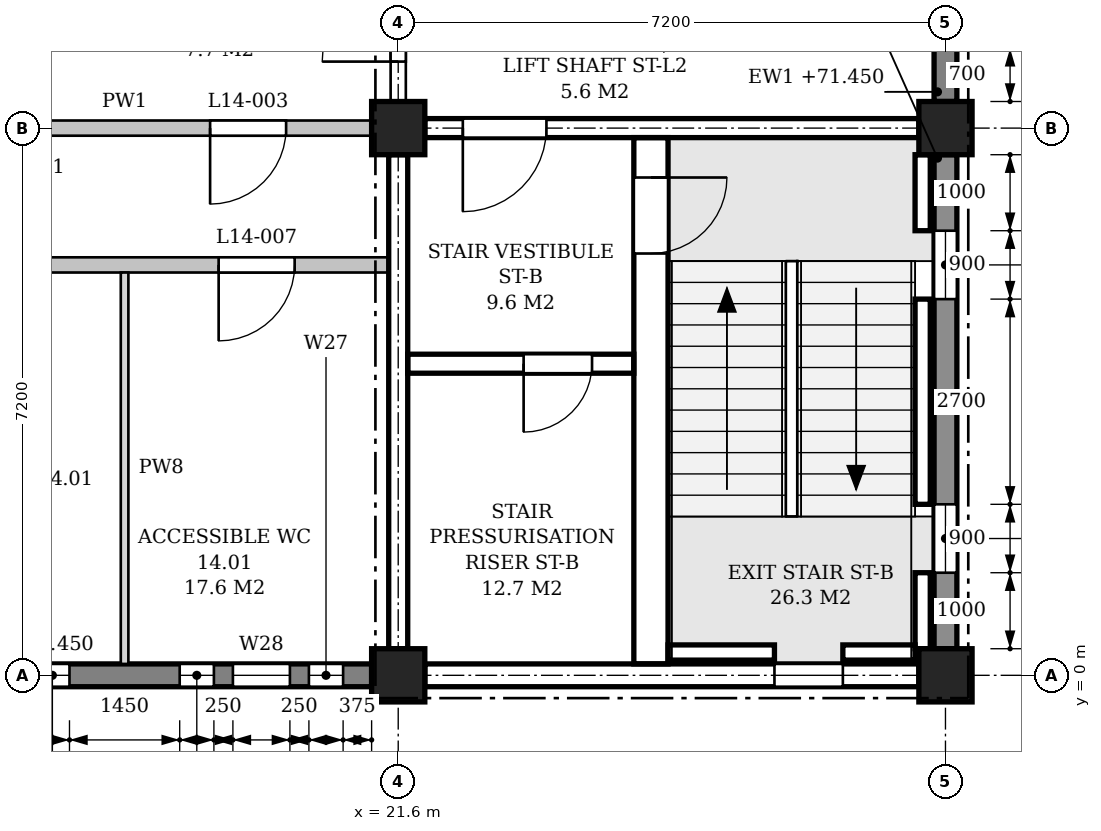
"""IFC4 building model, lengths in metres.
Left out: names, types, materials, properties, quantities, classifications, styles, units other than length and angle.
Written with IfcOpenShell. Run it as: python <this file> out.ifc"""

import sys

from ifc_helpers import new_model, si_unit, direction, frame, frame_2d, origin, origin_2d, place, context, subcontext, project, spatial, polyline, rectangle, outline, extrude, element, fill, save


model = new_model("IFC4")
c1 = context("Model", 3, precision=1e-05, world=origin(), true_north=direction((0.0, 1.0)))
c2 = subcontext(c1, "Body", "Model", "MODEL_VIEW")
j1 = project(units=[si_unit("LENGTHUNIT", "METRE"), si_unit("PLANEANGLEUNIT", "RADIAN")], contexts=[c1])
p1 = place(None, origin())
s1 = spatial("IfcSite", under=j1, at=p1, CompositionType="ELEMENT")
p2 = place(p1, origin())
s2 = spatial("IfcBuilding", under=s1, at=p2, CompositionType="ELEMENT")
p3 = place(p2, frame((0.0, 0.0, 67.8)))
s3 = spatial("IfcBuildingStorey", under=s2, at=p3, CompositionType="ELEMENT", Elevation=67.8)
for number, where, z_axis, x_axis in (
    (1, (21.6, 0.0, 0.0), (0.0, 0.0, 1.0), (1.0, 0.0, 0.0)),
    (2, (21.6, 7.2, 0.0), (0.0, 0.0, 1.0), (1.0, 0.0, 0.0)),
    (3, (28.8, 0.0, 0.0), (0.0, 0.0, 1.0), (1.0, 0.0, 0.0)),
    (4, (28.8, 7.2, 0.0), (0.0, 0.0, 1.0), (1.0, 0.0, 0.0)),
):
    element("IfcColumn", number, at=place(p3, frame(where, z_axis=z_axis, x_axis=x_axis)), inside=s3, PredefinedType="COLUMN", context=c2, shape_type="SweptSolid", body=[
        extrude(rectangle(XDim=0.7, YDim=0.7, at=origin_2d()), origin(), (0.0, 0.0, 1.0), 4.5),
    ])
p4 = place(p3, frame((14.75, 0.0, 0.0), z_axis=(0.0, 0.0, 1.0), x_axis=(1.0, 0.0, 0.0)))
e5 = element("IfcWall", 5, at=p4, inside=s3, PredefinedType="STANDARD", context=c2, shape_type="SweptSolid", body=[
    extrude(rectangle(XDim=6.5, YDim=0.3, at=frame_2d((3.25, 0.0))), origin(), (0.0, 0.0, 1.0), 3.65),
])
p5 = place(p4, frame((0.375, 0.0, 1.5)))
e6 = element("IfcOpeningElement", 6, at=p5, cuts=e5, PredefinedType="OPENING", context=c2, shape_type="SweptSolid", body=[
    extrude(outline(polyline([(0.0, 0.0), (0.45, 0.0), (0.45, 1.85), (0.225, 2.1), (0.0, 1.85), (0.0, 0.0)])), frame((0.0, 0.16, 0.0), z_axis=(0.0, -1.0, 0.0), x_axis=(1.0, 0.0, 0.0)), (0.0, 0.0, 1.0), 0.32),
])
p6 = place(p4, frame((1.075, 0.0, 0.9)))
e7 = element("IfcOpeningElement", 7, at=p6, cuts=e5, PredefinedType="OPENING", context=c2, shape_type="SweptSolid", body=[
    extrude(outline(polyline([(0.0, 0.0), (0.75, 0.0), (0.75, 2.25), (0.375, 2.7), (0.0, 2.25), (0.0, 0.0)])), frame((0.0, 0.16, 0.0), z_axis=(0.0, -1.0, 0.0), x_axis=(1.0, 0.0, 0.0)), (0.0, 0.0, 1.0), 0.32),
])
p7 = place(p4, frame((2.075, 0.0, 1.5)))
e8 = element("IfcOpeningElement", 8, at=p7, cuts=e5, PredefinedType="OPENING", context=c2, shape_type="SweptSolid", body=[
    extrude(outline(polyline([(0.0, 0.0), (0.45, 0.0), (0.45, 1.85), (0.225, 2.1), (0.0, 1.85), (0.0, 0.0)])), frame((0.0, 0.16, 0.0), z_axis=(0.0, -1.0, 0.0), x_axis=(1.0, 0.0, 0.0)), (0.0, 0.0, 1.0), 0.32),
])
p8 = place(p4, frame((3.975, 0.0, 1.5)))
e9 = element("IfcOpeningElement", 9, at=p8, cuts=e5, PredefinedType="OPENING", context=c2, shape_type="SweptSolid", body=[
    extrude(outline(polyline([(0.0, 0.0), (0.45, 0.0), (0.45, 1.85), (0.225, 2.1), (0.0, 1.85), (0.0, 0.0)])), frame((0.0, 0.16, 0.0), z_axis=(0.0, -1.0, 0.0), x_axis=(1.0, 0.0, 0.0)), (0.0, 0.0, 1.0), 0.32),
])
p9 = place(p4, frame((4.675, 0.0, 0.9)))
e10 = element("IfcOpeningElement", 10, at=p9, cuts=e5, PredefinedType="OPENING", context=c2, shape_type="SweptSolid", body=[
    extrude(outline(polyline([(0.0, 0.0), (0.75, 0.0), (0.75, 2.25), (0.375, 2.7), (0.0, 2.25), (0.0, 0.0)])), frame((0.0, 0.16, 0.0), z_axis=(0.0, -1.0, 0.0), x_axis=(1.0, 0.0, 0.0)), (0.0, 0.0, 1.0), 0.32),
])
p10 = place(p4, frame((5.675, 0.0, 1.5)))
e11 = element("IfcOpeningElement", 11, at=p10, cuts=e5, PredefinedType="OPENING", context=c2, shape_type="SweptSolid", body=[
    extrude(outline(polyline([(0.0, 0.0), (0.45, 0.0), (0.45, 1.85), (0.225, 2.1), (0.0, 1.85), (0.0, 0.0)])), frame((0.0, 0.16, 0.0), z_axis=(0.0, -1.0, 0.0), x_axis=(1.0, 0.0, 0.0)), (0.0, 0.0, 1.0), 0.32),
])
p11 = place(p3, frame((21.95, 0.0, 0.0), z_axis=(0.0, 0.0, 1.0), x_axis=(1.0, 0.0, 0.0)))
e12 = element("IfcWall", 12, at=p11, inside=s3, PredefinedType="STANDARD", context=c2, shape_type="SweptSolid", body=[
    extrude(rectangle(XDim=6.5, YDim=0.3, at=frame_2d((3.25, 0.0))), origin(), (0.0, 0.0, 1.0), 3.65),
])
p12 = place(p11, frame((4.6, 0.0, 0.9)))
e13 = element("IfcOpeningElement", 13, at=p12, cuts=e12, PredefinedType="OPENING", context=c2, shape_type="SweptSolid", body=[
    extrude(outline(polyline([(0.0, 0.0), (0.9, 0.0), (0.9, 2.25), (0.45, 2.7), (0.0, 2.25), (0.0, 0.0)])), frame((0.0, 0.16, 0.0), z_axis=(0.0, -1.0, 0.0), x_axis=(1.0, 0.0, 0.0)), (0.0, 0.0, 1.0), 0.32),
])
p13 = place(p3, frame((28.8, 0.35, 0.0), z_axis=(0.0, 0.0, 1.0), x_axis=(0.0, 1.0, 0.0)))
e14 = element("IfcWall", 14, at=p13, inside=s3, PredefinedType="STANDARD", context=c2, shape_type="SweptSolid", body=[
    extrude(rectangle(XDim=6.5, YDim=0.3, at=frame_2d((3.25, 0.0))), origin(), (0.0, 0.0, 1.0), 3.65),
])
p14 = place(p13, frame((1.0, 0.0, 0.9)))
e15 = element("IfcOpeningElement", 15, at=p14, cuts=e14, PredefinedType="OPENING", context=c2, shape_type="SweptSolid", body=[
    extrude(outline(polyline([(0.0, 0.0), (0.9, 0.0), (0.9, 2.25), (0.45, 2.7), (0.0, 2.25), (0.0, 0.0)])), frame((0.0, 0.16, 0.0), z_axis=(0.0, -1.0, 0.0), x_axis=(1.0, 0.0, 0.0)), (0.0, 0.0, 1.0), 0.32),
])
p15 = place(p13, frame((4.6, 0.0, 0.9)))
e16 = element("IfcOpeningElement", 16, at=p15, cuts=e14, PredefinedType="OPENING", context=c2, shape_type="SweptSolid", body=[
    extrude(outline(polyline([(0.0, 0.0), (0.9, 0.0), (0.9, 2.25), (0.45, 2.7), (0.0, 2.25), (0.0, 0.0)])), frame((0.0, 0.16, 0.0), z_axis=(0.0, -1.0, 0.0), x_axis=(1.0, 0.0, 0.0)), (0.0, 0.0, 1.0), 0.32),
])
p16 = place(p3, frame((28.8, 7.55, 0.0), z_axis=(0.0, 0.0, 1.0), x_axis=(0.0, 1.0, 0.0)))
e17 = element("IfcWall", 17, at=p16, inside=s3, PredefinedType="STANDARD", context=c2, shape_type="SweptSolid", body=[
    extrude(rectangle(XDim=6.5, YDim=0.3, at=frame_2d((3.25, 0.0))), origin(), (0.0, 0.0, 1.0), 3.65),
])
p17 = place(p16, frame((0.7, 0.0, 0.9)))
e18 = element("IfcOpeningElement", 18, at=p17, cuts=e17, PredefinedType="OPENING", context=c2, shape_type="SweptSolid", body=[
    extrude(outline(polyline([(0.0, 0.0), (1.5, 0.0), (1.5, 1.95), (0.75, 2.7), (0.0, 1.95), (0.0, 0.0)])), frame((0.0, 0.16, 0.0), z_axis=(0.0, -1.0, 0.0), x_axis=(1.0, 0.0, 0.0)), (0.0, 0.0, 1.0), 0.32),
])
p18 = place(p3, frame((21.95, 7.2, 0.0), z_axis=(0.0, 0.0, 1.0), x_axis=(1.0, 0.0, 0.0)))
e19 = element("IfcWall", 19, at=p18, inside=s3, PredefinedType="SHEAR", context=c2, shape_type="SweptSolid", body=[
    extrude(rectangle(XDim=6.5, YDim=0.25, at=frame_2d((3.25, 0.0))), origin(), (0.0, 0.0, 1.0), 3.6),
])
p19 = place(p18, frame((0.5, 0.0, 0.0)))
e20 = element("IfcOpeningElement", 20, at=p19, cuts=e19, PredefinedType="OPENING", context=c2, shape_type="SweptSolid", body=[
    extrude(rectangle(XDim=1.1, YDim=2.1, at=frame_2d((0.55, 1.05))), frame((0.0, 0.135, 0.0), z_axis=(0.0, -1.0, 0.0), x_axis=(1.0, 0.0, 0.0)), (0.0, 0.0, 1.0), 0.27),
])
p20 = place(p3, frame((21.6, 0.35, 0.0), z_axis=(0.0, 0.0, 1.0), x_axis=(0.0, 1.0, 0.0)))
e21 = element("IfcWall", 21, at=p20, inside=s3, PredefinedType="SHEAR", context=c2, shape_type="SweptSolid", body=[
    extrude(rectangle(XDim=6.5, YDim=0.25, at=frame_2d((3.25, 0.0))), origin(), (0.0, 0.0, 1.0), 3.6),
])
p21 = place(p3, frame((28.5, 0.35, -0.25), z_axis=(0.0, 0.0, 1.0), x_axis=(0.0, 1.0, 0.0)))
e22 = element("IfcWall", 22, at=p21, inside=s3, PredefinedType="SHEAR", context=c2, shape_type="SweptSolid", body=[
    extrude(rectangle(XDim=1.0, YDim=0.2, at=frame_2d((0.5, 0.0))), origin(), (0.0, 0.0, 1.0), 4.5),
])
p22 = place(p3, frame((28.5, 2.25, -0.25), z_axis=(0.0, 0.0, 1.0), x_axis=(0.0, 1.0, 0.0)))
e23 = element("IfcWall", 23, at=p22, inside=s3, PredefinedType="SHEAR", context=c2, shape_type="SweptSolid", body=[
    extrude(rectangle(XDim=2.7, YDim=0.2, at=frame_2d((1.35, 0.0))), origin(), (0.0, 0.0, 1.0), 4.5),
])
p23 = place(p3, frame((28.5, 5.85, -0.25), z_axis=(0.0, 0.0, 1.0), x_axis=(0.0, 1.0, 0.0)))
e24 = element("IfcWall", 24, at=p23, inside=s3, PredefinedType="SHEAR", context=c2, shape_type="SweptSolid", body=[
    extrude(rectangle(XDim=1.0, YDim=0.2, at=frame_2d((0.5, 0.0))), origin(), (0.0, 0.0, 1.0), 4.5),
])
p24 = place(p3, frame((25.15, 0.3, -0.25), z_axis=(0.0, 0.0, 1.0), x_axis=(1.0, 0.0, 0.0)))
e25 = element("IfcWall", 25, at=p24, inside=s3, PredefinedType="SHEAR", context=c2, shape_type="SweptSolid", body=[
    extrude(rectangle(XDim=1.4, YDim=0.2, at=frame_2d((0.7, 0.0))), origin(), (0.0, 0.0, 1.0), 4.5),
])
p25 = place(p3, frame((27.45, 0.3, -0.25), z_axis=(0.0, 0.0, 1.0), x_axis=(1.0, 0.0, 0.0)))
e26 = element("IfcWall", 26, at=p25, inside=s3, PredefinedType="SHEAR", context=c2, shape_type="SweptSolid", body=[
    extrude(rectangle(XDim=0.95, YDim=0.2, at=frame_2d((0.475, 0.0))), origin(), (0.0, 0.0, 1.0), 4.5),
])
p26 = place(p3, frame((24.925, 0.15, 0.0), z_axis=(0.0, 0.0, 1.0), x_axis=(0.0, 1.0, 0.0)))
e27 = element("IfcWall", 27, at=p26, inside=s3, PredefinedType="SHEAR", context=c2, shape_type="SweptSolid", body=[
    extrude(rectangle(XDim=6.925, YDim=0.45, at=frame_2d((3.462, 0.0))), origin(), (0.0, 0.0, 1.0), 4.25),
])
p27 = place(p26, frame((5.4, 0.0, 0.0)))
e28 = element("IfcOpeningElement", 28, at=p27, cuts=e27, PredefinedType="OPENING", context=c2, shape_type="SweptSolid", body=[
    extrude(rectangle(XDim=1.0, YDim=2.1, at=frame_2d((0.5, 1.05))), frame((0.0, 0.235, 0.0), z_axis=(0.0, -1.0, 0.0), x_axis=(1.0, 0.0, 0.0)), (0.0, 0.0, 1.0), 0.47),
])
p28 = place(p3, frame((21.725, 4.1, 0.0), z_axis=(0.0, 0.0, 1.0), x_axis=(1.0, 0.0, 0.0)))
e29 = element("IfcWall", 29, at=p28, inside=s3, PredefinedType="SHEAR", context=c2, shape_type="SweptSolid", body=[
    extrude(rectangle(XDim=2.975, YDim=0.25, at=frame_2d((1.487, 0.0))), origin(), (0.0, 0.0, 1.0), 4.25),
])
p29 = place(p28, frame((1.525, 0.0, 0.0)))
e30 = element("IfcOpeningElement", 30, at=p29, cuts=e29, PredefinedType="OPENING", context=c2, shape_type="SweptSolid", body=[
    extrude(rectangle(XDim=0.9, YDim=2.1, at=frame_2d((0.45, 1.05))), frame((0.0, 0.135, 0.0), z_axis=(0.0, -1.0, 0.0), x_axis=(1.0, 0.0, 0.0)), (0.0, 0.0, 1.0), 0.27),
])
p30 = place(p3, frame((7.325, 5.4, 0.0), z_axis=(0.0, 0.0, 1.0), x_axis=(1.0, 0.0, 0.0)))
e31 = element("IfcWall", 31, at=p30, inside=s3, PredefinedType="PARTITIONING", context=c2, shape_type="SweptSolid", body=[
    extrude(outline(polyline([(0.0, 0.0), (14.15, 0.0), (14.15, 3.6), (14.075, 3.6), (14.075, 4.25), (7.275, 4.25), (7.275, 3.6), (6.875, 3.6), (6.875, 4.25), (0.075, 4.25), (0.075, 3.6), (0.0, 3.6), (0.0, 0.0)])), frame((0.0, 0.1, 0.0), z_axis=(0.0, -1.0, 0.0), x_axis=(1.0, 0.0, 0.0)), (0.0, 0.0, 1.0), 0.2),
])
p31 = place(p30, frame((1.238, 0.0, 0.0)))
e32 = element("IfcOpeningElement", 32, at=p31, cuts=e31, PredefinedType="OPENING", context=c2, shape_type="SweptSolid", body=[
    extrude(rectangle(XDim=1.0, YDim=2.1, at=frame_2d((0.5, 1.05))), frame((0.0, 0.11, 0.0), z_axis=(0.0, -1.0, 0.0), x_axis=(1.0, 0.0, 0.0)), (0.0, 0.0, 1.0), 0.22),
])
p32 = place(p30, frame((4.775, 0.0, 0.0)))
e33 = element("IfcOpeningElement", 33, at=p32, cuts=e31, PredefinedType="OPENING", context=c2, shape_type="SweptSolid", body=[
    extrude(rectangle(XDim=1.0, YDim=2.1, at=frame_2d((0.5, 1.05))), frame((0.0, 0.11, 0.0), z_axis=(0.0, -1.0, 0.0), x_axis=(1.0, 0.0, 0.0)), (0.0, 0.0, 1.0), 0.22),
])
p33 = place(p30, frame((8.375, 0.0, 0.0)))
e34 = element("IfcOpeningElement", 34, at=p33, cuts=e31, PredefinedType="OPENING", context=c2, shape_type="SweptSolid", body=[
    extrude(rectangle(XDim=1.0, YDim=2.1, at=frame_2d((0.5, 1.05))), frame((0.0, 0.11, 0.0), z_axis=(0.0, -1.0, 0.0), x_axis=(1.0, 0.0, 0.0)), (0.0, 0.0, 1.0), 0.22),
])
p34 = place(p30, frame((11.913, 0.0, 0.0)))
e35 = element("IfcOpeningElement", 35, at=p34, cuts=e31, PredefinedType="OPENING", context=c2, shape_type="SweptSolid", body=[
    extrude(rectangle(XDim=1.0, YDim=2.1, at=frame_2d((0.5, 1.05))), frame((0.0, 0.11, 0.0), z_axis=(0.0, -1.0, 0.0), x_axis=(1.0, 0.0, 0.0)), (0.0, 0.0, 1.0), 0.22),
])
p35 = place(p3, frame((14.75, 7.2, 0.0), z_axis=(0.0, 0.0, 1.0), x_axis=(1.0, 0.0, 0.0)))
e36 = element("IfcWall", 36, at=p35, inside=s3, PredefinedType="PARTITIONING", context=c2, shape_type="SweptSolid", body=[
    extrude(rectangle(XDim=6.5, YDim=0.2, at=frame_2d((3.25, 0.0))), origin(), (0.0, 0.0, 1.0), 3.6),
])
p36 = place(p35, frame((4.375, 0.0, 0.0)))
e37 = element("IfcOpeningElement", 37, at=p36, cuts=e36, PredefinedType="OPENING", context=c2, shape_type="SweptSolid", body=[
    extrude(rectangle(XDim=1.0, YDim=2.1, at=frame_2d((0.5, 1.05))), frame((0.0, 0.11, 0.0), z_axis=(0.0, -1.0, 0.0), x_axis=(1.0, 0.0, 0.0)), (0.0, 0.0, 1.0), 0.22),
])
p37 = place(p3, frame((18.0, 0.15, 0.0), z_axis=(0.0, 0.0, 1.0), x_axis=(0.0, 1.0, 0.0)))
e38 = element("IfcWall", 38, at=p37, inside=s3, PredefinedType="PARTITIONING", context=c2, shape_type="SweptSolid", body=[
    extrude(rectangle(XDim=5.15, YDim=0.1, at=frame_2d((2.575, 0.0))), origin(), (0.0, 0.0, 1.0), 3.6),
])
p38 = place(p3, frame((21.6, 7.55, 0.0), z_axis=(0.0, 0.0, 1.0), x_axis=(0.0, 1.0, 0.0)))
e39 = element("IfcWall", 39, at=p38, inside=s3, PredefinedType="PARTITIONING", context=c2, shape_type="SweptSolid", body=[
    extrude(rectangle(XDim=2.775, YDim=0.2, at=frame_2d((1.387, 0.0))), origin(), (0.0, 0.0, 1.0), 3.6),
])
p39 = place(p38, frame((0.525, 0.0, 0.0)))
e40 = element("IfcOpeningElement", 40, at=p39, cuts=e39, PredefinedType="OPENING", context=c2, shape_type="SweptSolid", body=[
    extrude(rectangle(XDim=1.0, YDim=2.1, at=frame_2d((0.5, 1.05))), frame((0.0, 0.11, 0.0), z_axis=(0.0, -1.0, 0.0), x_axis=(1.0, 0.0, 0.0)), (0.0, 0.0, 1.0), 0.22),
])
p40 = place(p14, origin())
e41 = element("IfcWindow", 41, at=p40, inside=s3, PartitioningType="SINGLE_PANEL", PredefinedType="WINDOW", context=c2, shape_type="SweptSolid", body=[
    extrude(outline(polyline([(0.0, 0.0), (0.9, 0.0), (0.9, 2.25), (0.45, 2.7), (0.0, 2.25), (0.0, 0.0)])), frame((0.0, 0.03, 0.0), z_axis=(0.0, -1.0, 0.0), x_axis=(1.0, 0.0, 0.0)), (0.0, 0.0, 1.0), 0.06),
])
fill(e15, e41)
p41 = place(p15, origin())
e42 = element("IfcWindow", 42, at=p41, inside=s3, PartitioningType="SINGLE_PANEL", PredefinedType="WINDOW", context=c2, shape_type="SweptSolid", body=[
    extrude(outline(polyline([(0.0, 0.0), (0.9, 0.0), (0.9, 2.25), (0.45, 2.7), (0.0, 2.25), (0.0, 0.0)])), frame((0.0, 0.03, 0.0), z_axis=(0.0, -1.0, 0.0), x_axis=(1.0, 0.0, 0.0)), (0.0, 0.0, 1.0), 0.06),
])
fill(e16, e42)
p42 = place(p7, origin())
e43 = element("IfcWindow", 43, at=p42, inside=s3, PartitioningType="SINGLE_PANEL", PredefinedType="WINDOW", context=c2, shape_type="SweptSolid", body=[
    extrude(outline(polyline([(0.0, 0.0), (0.45, 0.0), (0.45, 1.85), (0.225, 2.1), (0.0, 1.85), (0.0, 0.0)])), frame((0.0, 0.03, 0.0), z_axis=(0.0, -1.0, 0.0), x_axis=(1.0, 0.0, 0.0)), (0.0, 0.0, 1.0), 0.06),
])
fill(e8, e43)
p43 = place(p8, origin())
e44 = element("IfcWindow", 44, at=p43, inside=s3, PartitioningType="SINGLE_PANEL", PredefinedType="WINDOW", context=c2, shape_type="SweptSolid", body=[
    extrude(outline(polyline([(0.0, 0.0), (0.45, 0.0), (0.45, 1.85), (0.225, 2.1), (0.0, 1.85), (0.0, 0.0)])), frame((0.0, 0.03, 0.0), z_axis=(0.0, -1.0, 0.0), x_axis=(1.0, 0.0, 0.0)), (0.0, 0.0, 1.0), 0.06),
])
fill(e9, e44)
p44 = place(p9, origin())
e45 = element("IfcWindow", 45, at=p44, inside=s3, PartitioningType="SINGLE_PANEL", PredefinedType="WINDOW", context=c2, shape_type="SweptSolid", body=[
    extrude(outline(polyline([(0.0, 0.0), (0.75, 0.0), (0.75, 2.25), (0.375, 2.7), (0.0, 2.25), (0.0, 0.0)])), frame((0.0, 0.03, 0.0), z_axis=(0.0, -1.0, 0.0), x_axis=(1.0, 0.0, 0.0)), (0.0, 0.0, 1.0), 0.06),
])
fill(e10, e45)
p45 = place(p10, origin())
e46 = element("IfcWindow", 46, at=p45, inside=s3, PartitioningType="SINGLE_PANEL", PredefinedType="WINDOW", context=c2, shape_type="SweptSolid", body=[
    extrude(outline(polyline([(0.0, 0.0), (0.45, 0.0), (0.45, 1.85), (0.225, 2.1), (0.0, 1.85), (0.0, 0.0)])), frame((0.0, 0.03, 0.0), z_axis=(0.0, -1.0, 0.0), x_axis=(1.0, 0.0, 0.0)), (0.0, 0.0, 1.0), 0.06),
])
fill(e11, e46)
p46 = place(p12, origin())
e47 = element("IfcWindow", 47, at=p46, inside=s3, PartitioningType="SINGLE_PANEL", PredefinedType="WINDOW", context=c2, shape_type="SweptSolid", body=[
    extrude(outline(polyline([(0.0, 0.0), (0.9, 0.0), (0.9, 2.25), (0.45, 2.7), (0.0, 2.25), (0.0, 0.0)])), frame((0.0, 0.03, 0.0), z_axis=(0.0, -1.0, 0.0), x_axis=(1.0, 0.0, 0.0)), (0.0, 0.0, 1.0), 0.06),
])
fill(e13, e47)
p47 = place(p27, frame((1.0, 0.0, 0.0), z_axis=(0.0, 0.0, 1.0), x_axis=(-1.0, 0.0, 0.0)))
e48 = element("IfcDoor", 48, at=p47, inside=s3, OperationType="SINGLE_SWING_LEFT", PredefinedType="DOOR", context=c2, shape_type="SweptSolid", body=[
    extrude(rectangle(XDim=1.0, YDim=2.1, at=frame_2d((0.5, 1.05))), frame((0.0, 0.025, 0.0), z_axis=(0.0, -1.0, 0.0), x_axis=(1.0, 0.0, 0.0)), (0.0, 0.0, 1.0), 0.05),
])
fill(e28, e48)
p48 = place(p19, frame((1.1, 0.0, 0.0), z_axis=(0.0, 0.0, 1.0), x_axis=(-1.0, 0.0, 0.0)))
e49 = element("IfcDoor", 49, at=p48, inside=s3, OperationType="SINGLE_SWING_RIGHT", PredefinedType="DOOR", context=c2, shape_type="SweptSolid", body=[
    extrude(rectangle(XDim=1.1, YDim=2.1, at=frame_2d((0.55, 1.05))), frame((0.0, 0.025, 0.0), z_axis=(0.0, -1.0, 0.0), x_axis=(1.0, 0.0, 0.0)), (0.0, 0.0, 1.0), 0.05),
])
fill(e20, e49)
p49 = place(p29, frame((0.9, 0.0, 0.0), z_axis=(0.0, 0.0, 1.0), x_axis=(-1.0, 0.0, 0.0)))
e50 = element("IfcDoor", 50, at=p49, inside=s3, OperationType="SINGLE_SWING_RIGHT", PredefinedType="DOOR", context=c2, shape_type="SweptSolid", body=[
    extrude(rectangle(XDim=0.9, YDim=2.1, at=frame_2d((0.45, 1.05))), frame((0.0, 0.025, 0.0), z_axis=(0.0, -1.0, 0.0), x_axis=(1.0, 0.0, 0.0)), (0.0, 0.0, 1.0), 0.05),
])
fill(e30, e50)
p50 = place(p39, origin())
e51 = element("IfcDoor", 51, at=p50, inside=s3, OperationType="SINGLE_SWING_LEFT", PredefinedType="DOOR", context=c2, shape_type="SweptSolid", body=[
    extrude(rectangle(XDim=1.0, YDim=2.1, at=frame_2d((0.5, 1.05))), frame((0.0, 0.025, 0.0), z_axis=(0.0, -1.0, 0.0), x_axis=(1.0, 0.0, 0.0)), (0.0, 0.0, 1.0), 0.05),
])
fill(e40, e51)
p51 = place(p36, frame((1.0, 0.0, 0.0), z_axis=(0.0, 0.0, 1.0), x_axis=(-1.0, 0.0, 0.0)))
e52 = element("IfcDoor", 52, at=p51, inside=s3, OperationType="SINGLE_SWING_RIGHT", PredefinedType="DOOR", context=c2, shape_type="SweptSolid", body=[
    extrude(rectangle(XDim=1.0, YDim=2.1, at=frame_2d((0.5, 1.05))), frame((0.0, 0.025, 0.0), z_axis=(0.0, -1.0, 0.0), x_axis=(1.0, 0.0, 0.0)), (0.0, 0.0, 1.0), 0.05),
])
fill(e37, e52)
p52 = place(p34, frame((1.0, 0.0, 0.0), z_axis=(0.0, 0.0, 1.0), x_axis=(-1.0, 0.0, 0.0)))
e53 = element("IfcDoor", 53, at=p52, inside=s3, OperationType="SINGLE_SWING_RIGHT", PredefinedType="DOOR", context=c2, shape_type="SweptSolid", body=[
    extrude(rectangle(XDim=1.0, YDim=2.1, at=frame_2d((0.5, 1.05))), frame((0.0, 0.025, 0.0), z_axis=(0.0, -1.0, 0.0), x_axis=(1.0, 0.0, 0.0)), (0.0, 0.0, 1.0), 0.05),
])
fill(e35, e53)
save(model, sys.argv[1])
